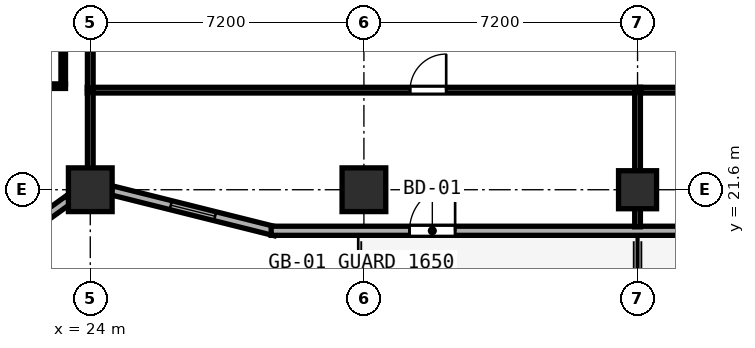
"""IFC4 building model, lengths in metres.
Left out: names, types, materials, properties, quantities, classifications, styles, units other than length and angle.
Written with IfcOpenShell. Run it as: python <this file> out.ifc"""

import sys

from ifc_helpers import new_model, si_unit, direction, frame, frame_2d, origin, origin_2d, place, context, subcontext, project, spatial, rectangle, hollow_rectangle, extrude, element, fill, save


model = new_model("IFC4")
c1 = context("Model", 3, precision=1e-05, world=origin(), true_north=direction((0.0, 1.0)))
c2 = subcontext(c1, "Body", "Model", "MODEL_VIEW")
j1 = project(units=[si_unit("LENGTHUNIT", "METRE"), si_unit("PLANEANGLEUNIT", "RADIAN")], contexts=[c1])
p1 = place(None, origin())
s1 = spatial("IfcSite", under=j1, at=p1, CompositionType="ELEMENT")
p2 = place(p1, origin())
s2 = spatial("IfcBuilding", under=s1, at=p2, CompositionType="ELEMENT")
p3 = place(p2, frame((0.0, 0.0, 62.8)))
s3 = spatial("IfcBuildingStorey", under=s2, at=p3, CompositionType="ELEMENT", Elevation=62.8)
for number, where, z_axis, x_axis in (
    (1, (24.0, 21.6, 0.0), (0.0, 0.0, 1.0), (1.0, 0.0, 0.0)),
    (2, (31.2, 21.6, 0.0), (0.0, 0.0, 1.0), (1.0, 0.0, 0.0)),
):
    element("IfcColumn", number, at=place(p3, frame(where, z_axis=z_axis, x_axis=x_axis)), inside=s3, PredefinedType="COLUMN", context=c2, shape_type="SweptSolid", body=[
        extrude(hollow_rectangle(XDim=1.15, YDim=1.15, WallThickness=0.042, at=origin_2d()), origin(), (0.0, 0.0, 1.0), 3.8),
    ])
p4 = place(p3, frame((38.4, 21.6, 0.0), z_axis=(0.0, 0.0, 1.0), x_axis=(1.0, 0.0, 0.0)))
e3 = element("IfcColumn", 3, at=p4, inside=s3, PredefinedType="COLUMN", context=c2, shape_type="SweptSolid", body=[
    extrude(hollow_rectangle(XDim=1.0, YDim=1.0, WallThickness=0.038, at=origin_2d()), origin(), (0.0, 0.0, 1.0), 3.8),
])
p5 = place(p3, frame((14.075, 14.602, 0.0), z_axis=(0.0, 0.0, 1.0), x_axis=(0.811543176492, 0.58429245476, 0.0)))
e4 = element("IfcWall", 4, at=p5, inside=s3, PredefinedType="SOLIDWALL", context=c2, shape_type="SweptSolid", body=[
    extrude(rectangle(XDim=11.531, YDim=0.24, at=frame_2d((5.765, 0.0))), origin(), (0.0, 0.0, 1.0), 3.097),
])
p6 = place(p5, frame((1.554, 0.0, 0.85)))
e5 = element("IfcOpeningElement", 5, at=p6, cuts=e4, PredefinedType="OPENING", context=c2, shape_type="SweptSolid", body=[
    extrude(rectangle(XDim=1.2, YDim=1.85, at=frame_2d((0.6, 0.925))), frame((0.0, 0.13, 0.0), z_axis=(0.0, -1.0, 0.0), x_axis=(1.0, 0.0, 0.0)), (0.0, 0.0, 1.0), 0.26),
])
p7 = place(p5, frame((6.656, 0.0, 0.85)))
e6 = element("IfcOpeningElement", 6, at=p7, cuts=e4, PredefinedType="OPENING", context=c2, shape_type="SweptSolid", body=[
    extrude(rectangle(XDim=1.2, YDim=1.85, at=frame_2d((0.6, 0.925))), frame((0.0, 0.13, 0.0), z_axis=(0.0, -1.0, 0.0), x_axis=(1.0, 0.0, 0.0)), (0.0, 0.0, 1.0), 0.26),
])
p8 = place(p5, frame((9.218, 0.0, 0.85)))
e7 = element("IfcOpeningElement", 7, at=p8, cuts=e4, PredefinedType="OPENING", context=c2, shape_type="SweptSolid", body=[
    extrude(rectangle(XDim=1.2, YDim=1.85, at=frame_2d((0.6, 0.925))), frame((0.0, 0.13, 0.0), z_axis=(0.0, -1.0, 0.0), x_axis=(1.0, 0.0, 0.0)), (0.0, 0.0, 1.0), 0.26),
])
p9 = place(p3, frame((24.567, 21.582, 0.0), z_axis=(0.0, 0.0, 1.0), x_axis=(0.970148978127, -0.24250971164, 0.0)))
e8 = element("IfcWall", 8, at=p9, inside=s3, PredefinedType="SOLIDWALL", context=c2, shape_type="SweptSolid", body=[
    extrude(rectangle(XDim=4.434, YDim=0.24, at=frame_2d((2.217, 0.0))), origin(), (0.0, 0.0, 1.0), 3.097),
])
p10 = place(p9, frame((1.6, 0.0, 0.85)))
e9 = element("IfcOpeningElement", 9, at=p10, cuts=e8, PredefinedType="OPENING", context=c2, shape_type="SweptSolid", body=[
    extrude(rectangle(XDim=1.2, YDim=1.85, at=frame_2d((0.6, 0.925))), frame((0.0, 0.13, 0.0), z_axis=(0.0, -1.0, 0.0), x_axis=(1.0, 0.0, 0.0)), (0.0, 0.0, 1.0), 0.26),
])
p11 = place(p3, frame((28.76, 20.52, 0.0), z_axis=(0.0, 0.0, 1.0), x_axis=(1.0, 0.0, 0.0)))
e10 = element("IfcWall", 10, at=p11, inside=s3, PredefinedType="SOLIDWALL", context=c2, shape_type="SweptSolid", body=[
    extrude(rectangle(XDim=19.281, YDim=0.24, at=frame_2d((9.64, 0.0))), origin(), (0.0, 0.0, 1.0), 3.6),
])
p12 = place(p11, frame((4.84, 0.0, 0.0), z_axis=(0.0, 0.0, 1.0), x_axis=(-1.0, 0.0, 0.0)))
e11 = element("IfcOpeningElement", 11, at=p12, cuts=e10, PredefinedType="OPENING", context=c2, shape_type="SweptSolid", body=[
    extrude(rectangle(XDim=1.2, YDim=2.15, at=frame_2d((0.6, 1.075))), frame((0.0, 0.13, 0.0), z_axis=(0.0, -1.0, 0.0), x_axis=(1.0, 0.0, 0.0)), (0.0, 0.0, 1.0), 0.26),
])
p13 = place(p11, frame((15.64, 0.0, 0.0), z_axis=(0.0, 0.0, 1.0), x_axis=(-1.0, 0.0, 0.0)))
e12 = element("IfcOpeningElement", 12, at=p13, cuts=e10, PredefinedType="OPENING", context=c2, shape_type="SweptSolid", body=[
    extrude(rectangle(XDim=1.2, YDim=2.15, at=frame_2d((0.6, 1.075))), frame((0.0, 0.13, 0.0), z_axis=(0.0, -1.0, 0.0), x_axis=(1.0, 0.0, 0.0)), (0.0, 0.0, 1.0), 0.26),
])
p14 = place(p3, frame((23.92, 24.22, 0.0), z_axis=(0.0, 0.0, 1.0), x_axis=(1.0, 0.0, 0.0)))
e13 = element("IfcWall", 13, at=p14, inside=s3, PredefinedType="PARTITIONING", context=c2, shape_type="SweptSolid", body=[
    extrude(rectangle(XDim=14.56, YDim=0.15, at=frame_2d((7.28, 0.0))), origin(), (0.0, 0.0, 1.0), 3.6),
])
p15 = place(p14, frame((9.445, 0.0, 0.0), z_axis=(0.0, 0.0, 1.0), x_axis=(-1.0, 0.0, 0.0)))
e14 = element("IfcOpeningElement", 14, at=p15, cuts=e13, PredefinedType="OPENING", context=c2, shape_type="SweptSolid", body=[
    extrude(rectangle(XDim=0.95, YDim=2.12, at=frame_2d((0.475, 1.06))), frame((0.0, 0.085, 0.0), z_axis=(0.0, -1.0, 0.0), x_axis=(1.0, 0.0, 0.0)), (0.0, 0.0, 1.0), 0.17),
])
p16 = place(p3, frame((24.0, 21.819, 0.0), z_axis=(0.0, 0.0, 1.0), x_axis=(0.0, 1.0, 0.0)))
e15 = element("IfcWall", 15, at=p16, inside=s3, PredefinedType="PARTITIONING", context=c2, shape_type="SweptSolid", body=[
    extrude(rectangle(XDim=2.341, YDim=0.15, at=frame_2d((1.171, 0.0))), origin(), (0.0, 0.0, 1.0), 3.097),
])
p17 = place(p3, frame((38.4, 20.625, 0.0), z_axis=(0.0, 0.0, 1.0), x_axis=(0.0, 1.0, 0.0)))
e16 = element("IfcWall", 16, at=p17, inside=s3, PredefinedType="PARTITIONING", context=c2, shape_type="SweptSolid", body=[
    extrude(rectangle(XDim=3.535, YDim=0.15, at=frame_2d((1.768, 0.0))), origin(), (0.0, 0.0, 1.0), 2.985),
])
p18 = place(p3, frame((38.482, 24.22, 0.0), z_axis=(0.0, 0.0, 1.0), x_axis=(1.0, 0.0, 0.0)))
e17 = element("IfcWall", 17, at=p18, inside=s3, PredefinedType="PARTITIONING", context=c2, shape_type="SweptSolid", body=[
    extrude(rectangle(XDim=7.198, YDim=0.15, at=frame_2d((3.599, 0.0))), origin(), (0.0, 0.0, 1.0), 3.6),
])
p19 = place(p18, frame((3.913, 0.0, 0.0), z_axis=(0.0, 0.0, 1.0), x_axis=(-1.0, 0.0, 0.0)))
e18 = element("IfcOpeningElement", 18, at=p19, cuts=e17, PredefinedType="OPENING", context=c2, shape_type="SweptSolid", body=[
    extrude(rectangle(XDim=0.95, YDim=2.12, at=frame_2d((0.475, 1.06))), frame((0.0, 0.085, 0.0), z_axis=(0.0, -1.0, 0.0), x_axis=(1.0, 0.0, 0.0)), (0.0, 0.0, 1.0), 0.17),
])
p20 = place(p3, frame((24.0, 24.28, 0.0), z_axis=(0.0, 0.0, 1.0), x_axis=(0.0, 1.0, 0.0)))
e19 = element("IfcWall", 19, at=p20, inside=s3, PredefinedType="PARTITIONING", context=c2, shape_type="SweptSolid", body=[
    extrude(rectangle(XDim=2.01, YDim=0.15, at=frame_2d((1.005, 0.0))), origin(), (0.0, 0.0, 1.0), 3.097),
])
p21 = place(p3, frame((21.248, 24.325, 0.0), z_axis=(0.0, 0.0, 1.0), x_axis=(1.0, 0.0, 0.0)))
e20 = element("IfcWall", 20, at=p21, inside=s3, PredefinedType="PARTITIONING", context=c2, shape_type="SweptSolid", body=[
    extrude(rectangle(XDim=2.1, YDim=0.12, at=frame_2d((1.05, 0.0))), origin(), (0.0, 0.0, 1.0), 3.6),
])
p22 = place(p3, frame((23.288, 24.37, 0.0), z_axis=(0.0, 0.0, 1.0), x_axis=(0.0, 1.0, 0.0)))
e21 = element("IfcWall", 21, at=p22, inside=s3, PredefinedType="PARTITIONING", context=c2, shape_type="SweptSolid", body=[
    extrude(rectangle(XDim=1.83, YDim=0.12, at=frame_2d((0.915, 0.0))), origin(), (0.0, 0.0, 1.0), 3.6),
])
p23 = place(p10, origin())
e22 = element("IfcWindow", 22, at=p23, inside=s3, PartitioningType="SINGLE_PANEL", PredefinedType="WINDOW", context=c2, shape_type="SweptSolid", body=[
    extrude(rectangle(XDim=1.2, YDim=1.85, at=frame_2d((0.6, 0.925))), frame((0.0, 0.03, 0.0), z_axis=(0.0, -1.0, 0.0), x_axis=(1.0, 0.0, 0.0)), (0.0, 0.0, 1.0), 0.06),
])
fill(e9, e22)
p24 = place(p12, origin())
e23 = element("IfcDoor", 23, at=p24, inside=s3, OperationType="SINGLE_SWING_LEFT", PredefinedType="DOOR", context=c2, shape_type="SweptSolid", body=[
    extrude(rectangle(XDim=1.2, YDim=2.15, at=frame_2d((0.6, 1.075))), frame((0.0, 0.025, 0.0), z_axis=(0.0, -1.0, 0.0), x_axis=(1.0, 0.0, 0.0)), (0.0, 0.0, 1.0), 0.05),
])
fill(e11, e23)
p25 = place(p15, origin())
e24 = element("IfcDoor", 24, at=p25, inside=s3, OperationType="SINGLE_SWING_LEFT", PredefinedType="DOOR", context=c2, shape_type="SweptSolid", body=[
    extrude(rectangle(XDim=0.95, YDim=2.12, at=frame_2d((0.475, 1.06))), frame((0.0, 0.025, 0.0), z_axis=(0.0, -1.0, 0.0), x_axis=(1.0, 0.0, 0.0)), (0.0, 0.0, 1.0), 0.05),
])
fill(e14, e24)
save(model, sys.argv[1])
